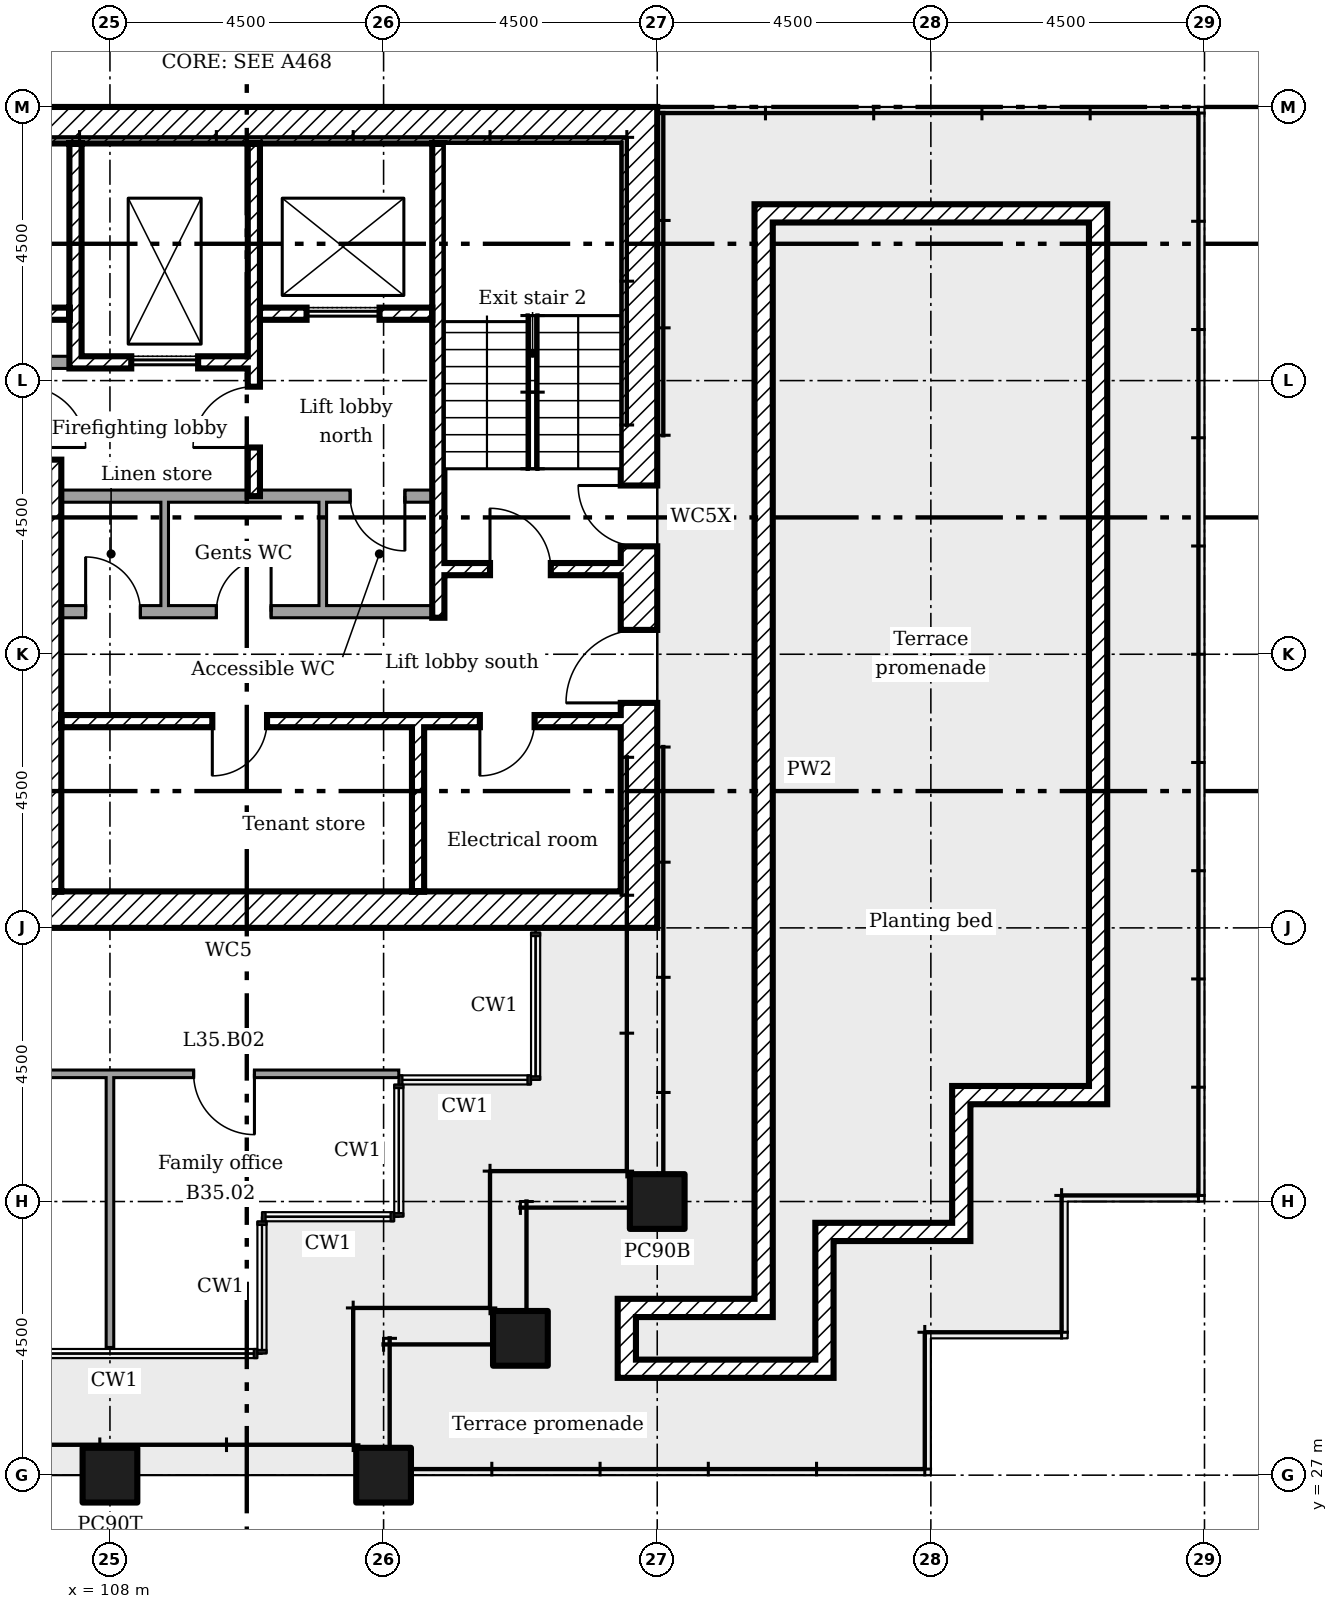
"""IFC4 building model, lengths in metres.
Left out: names, types, materials, properties, quantities, classifications, styles, units other than length and angle.
Written with IfcOpenShell. Run it as: python <this file> out.ifc"""

import sys

from ifc_helpers import new_model, si_unit, direction, frame, frame_2d, origin, origin_2d, place, context, subcontext, project, spatial, rectangle, extrude, element, fill, save


model = new_model("IFC4")
c1 = context("Model", 3, precision=1e-05, world=origin(), true_north=direction((0.0, 1.0)))
c2 = subcontext(c1, "Body", "Model", "MODEL_VIEW")
j1 = project(units=[si_unit("LENGTHUNIT", "METRE"), si_unit("PLANEANGLEUNIT", "RADIAN")], contexts=[c1])
p1 = place(None, origin())
s1 = spatial("IfcSite", under=j1, at=p1, CompositionType="ELEMENT")
p2 = place(p1, origin())
s2 = spatial("IfcBuilding", under=s1, at=p2, CompositionType="ELEMENT")
p3 = place(p2, frame((0.0, 0.0, 143.8)))
s3 = spatial("IfcBuildingStorey", under=s2, at=p3, CompositionType="ELEMENT", Elevation=143.8)
for number, where in (
    (1, (108.0, 27.0, 0.0)),
    (2, (112.5, 27.0, 0.0)),
    (3, (114.75, 29.25, 0.0)),
    (4, (117.0, 31.5, 0.0)),
):
    element("IfcColumn", number, at=place(p3, frame(where)), inside=s3, PredefinedType="COLUMN", context=c2, shape_type="SweptSolid", body=[
        extrude(rectangle(XDim=0.9, YDim=0.9, at=origin_2d()), origin(), (0.0, 0.0, 1.0), 3.6),
    ])
p4 = place(p3, frame((116.5, 29.9, 0.0), z_axis=(0.0, 0.0, 1.0), x_axis=(0.0, -1.0, 0.0)))
e5 = element("IfcWall", 5, at=p4, inside=s3, PredefinedType="SOLIDWALL", context=c2, shape_type="SweptSolid", body=[
    extrude(rectangle(XDim=1.3, YDim=0.3, at=frame_2d((0.65, 0.0))), origin(), (0.0, 0.0, 1.0), 0.6),
])
p5 = place(p3, frame((116.65, 28.75, 0.0)))
e6 = element("IfcWall", 6, at=p5, inside=s3, PredefinedType="SOLIDWALL", context=c2, shape_type="SweptSolid", body=[
    extrude(rectangle(XDim=3.25, YDim=0.3, at=frame_2d((1.625, 0.0))), origin(), (0.0, 0.0, 1.0), 0.6),
])
p6 = place(p3, frame((119.75, 28.9, 0.0), z_axis=(0.0, 0.0, 1.0), x_axis=(0.0, 1.0, 0.0)))
e7 = element("IfcWall", 7, at=p6, inside=s3, PredefinedType="SOLIDWALL", context=c2, shape_type="SweptSolid", body=[
    extrude(rectangle(XDim=2.25, YDim=0.3, at=frame_2d((1.125, 0.0))), origin(), (0.0, 0.0, 1.0), 0.6),
])
p7 = place(p3, frame((119.9, 31.0, 0.0)))
e8 = element("IfcWall", 8, at=p7, inside=s3, PredefinedType="SOLIDWALL", context=c2, shape_type="SweptSolid", body=[
    extrude(rectangle(XDim=2.25, YDim=0.3, at=frame_2d((1.125, 0.0))), origin(), (0.0, 0.0, 1.0), 0.6),
])
p8 = place(p3, frame((122.0, 31.15, 0.0), z_axis=(0.0, 0.0, 1.0), x_axis=(0.0, 1.0, 0.0)))
e9 = element("IfcWall", 9, at=p8, inside=s3, PredefinedType="SOLIDWALL", context=c2, shape_type="SweptSolid", body=[
    extrude(rectangle(XDim=2.25, YDim=0.3, at=frame_2d((1.125, 0.0))), origin(), (0.0, 0.0, 1.0), 0.6),
])
p9 = place(p3, frame((122.15, 33.25, 0.0)))
e10 = element("IfcWall", 10, at=p9, inside=s3, PredefinedType="SOLIDWALL", context=c2, shape_type="SweptSolid", body=[
    extrude(rectangle(XDim=2.25, YDim=0.3, at=frame_2d((1.125, 0.0))), origin(), (0.0, 0.0, 1.0), 0.6),
])
p10 = place(p3, frame((124.25, 33.4, 0.0), z_axis=(0.0, 0.0, 1.0), x_axis=(0.0, 1.0, 0.0)))
e11 = element("IfcWall", 11, at=p10, inside=s3, PredefinedType="SOLIDWALL", context=c2, shape_type="SweptSolid", body=[
    extrude(rectangle(XDim=14.5, YDim=0.3, at=frame_2d((7.25, 0.0))), origin(), (0.0, 0.0, 1.0), 0.6),
])
p11 = place(p3, frame((124.1, 47.75, 0.0), z_axis=(0.0, 0.0, 1.0), x_axis=(-1.0, 0.0, 0.0)))
e12 = element("IfcWall", 12, at=p11, inside=s3, PredefinedType="SOLIDWALL", context=c2, shape_type="SweptSolid", body=[
    extrude(rectangle(XDim=5.5, YDim=0.3, at=frame_2d((2.75, 0.0))), origin(), (0.0, 0.0, 1.0), 0.6),
])
p12 = place(p3, frame((118.75, 47.6, 0.0), z_axis=(0.0, 0.0, 1.0), x_axis=(0.0, -1.0, 0.0)))
e13 = element("IfcWall", 13, at=p12, inside=s3, PredefinedType="SOLIDWALL", context=c2, shape_type="SweptSolid", body=[
    extrude(rectangle(XDim=18.0, YDim=0.3, at=frame_2d((9.0, 0.0))), origin(), (0.0, 0.0, 1.0), 0.6),
])
p13 = place(p3, frame((118.6, 29.75, 0.0), z_axis=(0.0, 0.0, 1.0), x_axis=(-1.0, 0.0, 0.0)))
e14 = element("IfcWall", 14, at=p13, inside=s3, PredefinedType="SOLIDWALL", context=c2, shape_type="SweptSolid", body=[
    extrude(rectangle(XDim=1.95, YDim=0.3, at=frame_2d((0.975, 0.0))), origin(), (0.0, 0.0, 1.0), 0.6),
])
p14 = place(p3, frame((116.7, 36.0, 0.0), z_axis=(0.0, 0.0, 1.0), x_axis=(0.0, 1.0, 0.0)))
e15 = element("IfcWall", 15, at=p14, inside=s3, PredefinedType="SHEAR", context=c2, shape_type="SweptSolid", body=[
    extrude(rectangle(XDim=13.5, YDim=0.6, at=frame_2d((6.75, 0.0))), origin(), (0.0, 0.0, 1.0), 3.35),
])
p15 = place(p14, frame((3.7, 0.0, 0.0)))
e16 = element("IfcOpeningElement", 16, at=p15, cuts=e15, PredefinedType="OPENING", context=c2, shape_type="SweptSolid", body=[
    extrude(rectangle(XDim=1.2, YDim=2.1, at=frame_2d((0.6, 1.05))), frame((0.0, 0.31, 0.0), z_axis=(0.0, -1.0, 0.0), x_axis=(1.0, 0.0, 0.0)), (0.0, 0.0, 1.0), 0.62),
])
p16 = place(p14, frame((6.275, 0.0, 0.0)))
e17 = element("IfcOpeningElement", 17, at=p16, cuts=e15, PredefinedType="OPENING", context=c2, shape_type="SweptSolid", body=[
    extrude(rectangle(XDim=1.0, YDim=2.1, at=frame_2d((0.5, 1.05))), frame((0.0, 0.31, 0.0), z_axis=(0.0, -1.0, 0.0), x_axis=(1.0, 0.0, 0.0)), (0.0, 0.0, 1.0), 0.62),
])
for number, where in (
    (18, (103.5, 49.2, 0.0)),
    (19, (103.5, 36.3, 0.0)),
):
    element("IfcWall", number, at=place(p3, frame(where)), inside=s3, PredefinedType="SHEAR", context=c2, shape_type="SweptSolid", body=[
        extrude(rectangle(XDim=12.9, YDim=0.6, at=frame_2d((6.45, 0.0))), origin(), (0.0, 0.0, 1.0), 3.35),
    ])
p17 = place(p3, frame((107.433, 48.9, 0.0), z_axis=(0.0, 0.0, 1.0), x_axis=(0.0, -1.0, 0.0)))
e20 = element("IfcWall", 20, at=p17, inside=s3, PredefinedType="SHEAR", context=c2, shape_type="SweptSolid", body=[
    extrude(rectangle(XDim=3.7, YDim=0.2, at=frame_2d((1.85, 0.0))), origin(), (0.0, 0.0, 1.0), 3.35),
])
p18 = place(p3, frame((110.367, 48.9, 0.0), z_axis=(0.0, 0.0, 1.0), x_axis=(0.0, -1.0, 0.0)))
e21 = element("IfcWall", 21, at=p18, inside=s3, PredefinedType="SHEAR", context=c2, shape_type="SweptSolid", body=[
    extrude(rectangle(XDim=5.8, YDim=0.2, at=frame_2d((2.9, 0.0))), origin(), (0.0, 0.0, 1.0), 3.35),
])
p19 = place(p18, frame((4.0, 0.0, 0.0)))
e22 = element("IfcOpeningElement", 22, at=p19, cuts=e21, PredefinedType="OPENING", context=c2, shape_type="SweptSolid", body=[
    extrude(rectangle(XDim=1.0, YDim=2.1, at=frame_2d((0.5, 1.05))), frame((0.0, 0.11, 0.0), z_axis=(0.0, -1.0, 0.0), x_axis=(1.0, 0.0, 0.0)), (0.0, 0.0, 1.0), 0.22),
])
p20 = place(p3, frame((113.067, 36.6, 0.0), z_axis=(0.0, 0.0, 1.0), x_axis=(0.0, 1.0, 0.0)))
e23 = element("IfcWall", 23, at=p20, inside=s3, PredefinedType="SHEAR", context=c2, shape_type="SweptSolid", body=[
    extrude(rectangle(XDim=2.7, YDim=0.2, at=frame_2d((1.35, 0.0))), origin(), (0.0, 0.0, 1.0), 3.35),
])
p21 = place(p3, frame((106.5, 45.3, 0.0)))
e24 = element("IfcWall", 24, at=p21, inside=s3, PredefinedType="PARTITIONING", context=c2, shape_type="SweptSolid", body=[
    extrude(rectangle(XDim=0.833, YDim=0.2, at=frame_2d((0.417, 0.0))), origin(), (0.0, 0.0, 1.0), 3.35),
])
p22 = place(p3, frame((104.1, 46.1, 0.0)))
e25 = element("IfcWall", 25, at=p22, inside=s3, PredefinedType="SHEAR", context=c2, shape_type="SweptSolid", body=[
    extrude(rectangle(XDim=3.233, YDim=0.2, at=frame_2d((1.617, 0.0))), origin(), (0.0, 0.0, 1.0), 3.35),
])
p23 = place(p22, frame((1.267, 0.0, 0.0)))
e26 = element("IfcOpeningElement", 26, at=p23, cuts=e25, PredefinedType="OPENING", context=c2, shape_type="SweptSolid", body=[
    extrude(rectangle(XDim=1.2, YDim=2.1, at=frame_2d((0.6, 1.05))), frame((0.0, 0.11, 0.0), z_axis=(0.0, -1.0, 0.0), x_axis=(1.0, 0.0, 0.0)), (0.0, 0.0, 1.0), 0.22),
])
p24 = place(p3, frame((110.467, 46.1, 0.0)))
e27 = element("IfcWall", 27, at=p24, inside=s3, PredefinedType="SHEAR", context=c2, shape_type="SweptSolid", body=[
    extrude(rectangle(XDim=2.833, YDim=0.2, at=frame_2d((1.417, 0.0))), origin(), (0.0, 0.0, 1.0), 3.35),
])
p25 = place(p24, frame((0.767, 0.0, 0.0)))
e28 = element("IfcOpeningElement", 28, at=p25, cuts=e27, PredefinedType="OPENING", context=c2, shape_type="SweptSolid", body=[
    extrude(rectangle(XDim=1.2, YDim=2.1, at=frame_2d((0.6, 1.05))), frame((0.0, 0.11, 0.0), z_axis=(0.0, -1.0, 0.0), x_axis=(1.0, 0.0, 0.0)), (0.0, 0.0, 1.0), 0.22),
])
p26 = place(p3, frame((107.533, 45.3, 0.0)))
e29 = element("IfcWall", 29, at=p26, inside=s3, PredefinedType="SHEAR", context=c2, shape_type="SweptSolid", body=[
    extrude(rectangle(XDim=2.733, YDim=0.2, at=frame_2d((1.367, 0.0))), origin(), (0.0, 0.0, 1.0), 3.35),
])
p27 = place(p26, frame((0.817, 0.0, 0.0)))
e30 = element("IfcOpeningElement", 30, at=p27, cuts=e29, PredefinedType="OPENING", context=c2, shape_type="SweptSolid", body=[
    extrude(rectangle(XDim=1.1, YDim=2.1, at=frame_2d((0.55, 1.05))), frame((0.0, 0.11, 0.0), z_axis=(0.0, -1.0, 0.0), x_axis=(1.0, 0.0, 0.0)), (0.0, 0.0, 1.0), 0.22),
])
p28 = place(p3, frame((107.2, 39.4, 0.0)))
e31 = element("IfcWall", 31, at=p28, inside=s3, PredefinedType="SHEAR", context=c2, shape_type="SweptSolid", body=[
    extrude(rectangle(XDim=9.2, YDim=0.2, at=frame_2d((4.6, 0.0))), origin(), (0.0, 0.0, 1.0), 3.35),
])
p29 = place(p28, frame((2.483, 0.0, 0.0)))
e32 = element("IfcOpeningElement", 32, at=p29, cuts=e31, PredefinedType="OPENING", context=c2, shape_type="SweptSolid", body=[
    extrude(rectangle(XDim=0.9, YDim=2.1, at=frame_2d((0.45, 1.05))), frame((0.0, 0.11, 0.0), z_axis=(0.0, -1.0, 0.0), x_axis=(1.0, 0.0, 0.0)), (0.0, 0.0, 1.0), 0.22),
])
p30 = place(p28, frame((6.883, 0.0, 0.0)))
e33 = element("IfcOpeningElement", 33, at=p30, cuts=e31, PredefinedType="OPENING", context=c2, shape_type="SweptSolid", body=[
    extrude(rectangle(XDim=0.9, YDim=2.1, at=frame_2d((0.45, 1.05))), frame((0.0, 0.11, 0.0), z_axis=(0.0, -1.0, 0.0), x_axis=(1.0, 0.0, 0.0)), (0.0, 0.0, 1.0), 0.22),
])
p31 = place(p3, frame((107.1, 36.6, 0.0), z_axis=(0.0, 0.0, 1.0), x_axis=(0.0, 1.0, 0.0)))
e34 = element("IfcWall", 34, at=p31, inside=s3, PredefinedType="SHEAR", context=c2, shape_type="SweptSolid", body=[
    extrude(rectangle(XDim=7.1, YDim=0.2, at=frame_2d((3.55, 0.0))), origin(), (0.0, 0.0, 1.0), 3.35),
])
p32 = place(p3, frame((113.5, 41.9, 0.0)))
e35 = element("IfcWall", 35, at=p32, inside=s3, PredefinedType="SHEAR", context=c2, shape_type="SweptSolid", body=[
    extrude(rectangle(XDim=2.9, YDim=0.2, at=frame_2d((1.45, 0.0))), origin(), (0.0, 0.0, 1.0), 3.35),
])
p33 = place(p32, frame((0.75, 0.0, 0.0)))
e36 = element("IfcOpeningElement", 36, at=p33, cuts=e35, PredefinedType="OPENING", context=c2, shape_type="SweptSolid", body=[
    extrude(rectangle(XDim=1.0, YDim=2.1, at=frame_2d((0.5, 1.05))), frame((0.0, 0.11, 0.0), z_axis=(0.0, -1.0, 0.0), x_axis=(1.0, 0.0, 0.0)), (0.0, 0.0, 1.0), 0.22),
])
p34 = place(p3, frame((113.4, 41.1, 0.0), z_axis=(0.0, 0.0, 1.0), x_axis=(0.0, 1.0, 0.0)))
e37 = element("IfcWall", 37, at=p34, inside=s3, PredefinedType="SHEAR", context=c2, shape_type="SweptSolid", body=[
    extrude(rectangle(XDim=7.8, YDim=0.2, at=frame_2d((3.9, 0.0))), origin(), (0.0, 0.0, 1.0), 3.35),
])
p35 = place(p3, frame((107.2, 43.1, 0.0)))
e38 = element("IfcWall", 38, at=p35, inside=s3, PredefinedType="PARTITIONING", context=c2, shape_type="SweptSolid", body=[
    extrude(rectangle(XDim=6.1, YDim=0.2, at=frame_2d((3.05, 0.0))), origin(), (0.0, 0.0, 1.0), 3.35),
])
p36 = place(p35, frame((4.75, 0.0, 0.0)))
e39 = element("IfcOpeningElement", 39, at=p36, cuts=e38, PredefinedType="OPENING", context=c2, shape_type="SweptSolid", body=[
    extrude(rectangle(XDim=0.9, YDim=2.1, at=frame_2d((0.45, 1.05))), frame((0.0, 0.11, 0.0), z_axis=(0.0, -1.0, 0.0), x_axis=(1.0, 0.0, 0.0)), (0.0, 0.0, 1.0), 0.22),
])
p37 = place(p3, frame((107.2, 41.2, 0.0)))
e40 = element("IfcWall", 40, at=p37, inside=s3, PredefinedType="PARTITIONING", context=c2, shape_type="SweptSolid", body=[
    extrude(rectangle(XDim=6.1, YDim=0.2, at=frame_2d((3.05, 0.0))), origin(), (0.0, 0.0, 1.0), 3.35),
])
p38 = place(p37, frame((0.4, 0.0, 0.0)))
e41 = element("IfcOpeningElement", 41, at=p38, cuts=e40, PredefinedType="OPENING", context=c2, shape_type="SweptSolid", body=[
    extrude(rectangle(XDim=0.9, YDim=2.1, at=frame_2d((0.45, 1.05))), frame((0.0, 0.11, 0.0), z_axis=(0.0, -1.0, 0.0), x_axis=(1.0, 0.0, 0.0)), (0.0, 0.0, 1.0), 0.22),
])
p39 = place(p37, frame((2.55, 0.0, 0.0)))
e42 = element("IfcOpeningElement", 42, at=p39, cuts=e40, PredefinedType="OPENING", context=c2, shape_type="SweptSolid", body=[
    extrude(rectangle(XDim=0.9, YDim=2.1, at=frame_2d((0.45, 1.05))), frame((0.0, 0.11, 0.0), z_axis=(0.0, -1.0, 0.0), x_axis=(1.0, 0.0, 0.0)), (0.0, 0.0, 1.0), 0.22),
])
for number, where, z_axis, x_axis in (
    (43, (108.9, 41.3, 0.0), (0.0, 0.0, 1.0), (0.0, 1.0, 0.0)),
    (44, (111.5, 41.3, 0.0), (0.0, 0.0, 1.0), (0.0, 1.0, 0.0)),
):
    element("IfcWall", number, at=place(p3, frame(where, z_axis=z_axis, x_axis=x_axis)), inside=s3, PredefinedType="PARTITIONING", context=c2, shape_type="SweptSolid", body=[
        extrude(rectangle(XDim=1.7, YDim=0.125, at=frame_2d((0.85, 0.0))), origin(), (0.0, 0.0, 1.0), 3.35),
    ])
p40 = place(p3, frame((99.837, 33.6, 0.0)))
e45 = element("IfcWall", 45, at=p40, inside=s3, PredefinedType="PARTITIONING", context=c2, shape_type="SweptSolid", body=[
    extrude(rectangle(XDim=12.913, YDim=0.125, at=frame_2d((6.456, 0.0))), origin(), (0.0, 0.0, 1.0), 3.45),
])
p41 = place(p40, frame((3.913, 0.0, 0.0)))
e46 = element("IfcOpeningElement", 46, at=p41, cuts=e45, PredefinedType="OPENING", context=c2, shape_type="SweptSolid", body=[
    extrude(rectangle(XDim=1.0, YDim=2.1, at=frame_2d((0.5, 1.05))), frame((0.0, 0.073, 0.0), z_axis=(0.0, -1.0, 0.0), x_axis=(1.0, 0.0, 0.0)), (0.0, 0.0, 1.0), 0.145),
])
p42 = place(p40, frame((9.539, 0.0, 0.0)))
e47 = element("IfcOpeningElement", 47, at=p42, cuts=e45, PredefinedType="OPENING", context=c2, shape_type="SweptSolid", body=[
    extrude(rectangle(XDim=1.0, YDim=2.1, at=frame_2d((0.5, 1.05))), frame((0.0, 0.073, 0.0), z_axis=(0.0, -1.0, 0.0), x_axis=(1.0, 0.0, 0.0)), (0.0, 0.0, 1.0), 0.145),
])
p43 = place(p3, frame((108.0, 29.1, 0.0), z_axis=(0.0, 0.0, 1.0), x_axis=(0.0, 1.0, 0.0)))
e48 = element("IfcWall", 48, at=p43, inside=s3, PredefinedType="PARTITIONING", context=c2, shape_type="SweptSolid", body=[
    extrude(rectangle(XDim=4.5, YDim=0.125, at=frame_2d((2.25, 0.0))), origin(), (0.0, 0.0, 1.0), 2.851),
])
p44 = place(p15, origin())
e49 = element("IfcDoor", 49, at=p44, inside=s3, OperationType="SINGLE_SWING_RIGHT", PredefinedType="DOOR", context=c2, shape_type="SweptSolid", body=[
    extrude(rectangle(XDim=1.2, YDim=2.1, at=frame_2d((0.6, 1.05))), frame((0.0, 0.025, 0.0), z_axis=(0.0, -1.0, 0.0), x_axis=(1.0, 0.0, 0.0)), (0.0, 0.0, 1.0), 0.05),
])
fill(e16, e49)
p45 = place(p33, origin())
e50 = element("IfcDoor", 50, at=p45, inside=s3, OperationType="SINGLE_SWING_RIGHT", PredefinedType="DOOR", context=c2, shape_type="SweptSolid", body=[
    extrude(rectangle(XDim=1.0, YDim=2.1, at=frame_2d((0.5, 1.05))), frame((0.0, 0.025, 0.0), z_axis=(0.0, -1.0, 0.0), x_axis=(1.0, 0.0, 0.0)), (0.0, 0.0, 1.0), 0.05),
])
fill(e36, e50)
p46 = place(p16, origin())
e51 = element("IfcDoor", 51, at=p46, inside=s3, OperationType="SINGLE_SWING_LEFT", PredefinedType="DOOR", context=c2, shape_type="SweptSolid", body=[
    extrude(rectangle(XDim=1.0, YDim=2.1, at=frame_2d((0.5, 1.05))), frame((0.0, 0.025, 0.0), z_axis=(0.0, -1.0, 0.0), x_axis=(1.0, 0.0, 0.0)), (0.0, 0.0, 1.0), 0.05),
])
fill(e17, e51)
p47 = place(p19, frame((1.0, 0.0, 0.0), x_axis=(-1.0, 0.0, 0.0)))
e52 = element("IfcDoor", 52, at=p47, inside=s3, OperationType="SINGLE_SWING_RIGHT", PredefinedType="DOOR", context=c2, shape_type="SweptSolid", body=[
    extrude(rectangle(XDim=1.0, YDim=2.1, at=frame_2d((0.5, 1.05))), frame((0.0, 0.025, 0.0), z_axis=(0.0, -1.0, 0.0), x_axis=(1.0, 0.0, 0.0)), (0.0, 0.0, 1.0), 0.05),
])
fill(e22, e52)
p48 = place(p29, frame((0.9, 0.0, 0.0), x_axis=(-1.0, 0.0, 0.0)))
e53 = element("IfcDoor", 53, at=p48, inside=s3, OperationType="SINGLE_SWING_LEFT", PredefinedType="DOOR", context=c2, shape_type="SweptSolid", body=[
    extrude(rectangle(XDim=0.9, YDim=2.1, at=frame_2d((0.45, 1.05))), frame((0.0, 0.025, 0.0), z_axis=(0.0, -1.0, 0.0), x_axis=(1.0, 0.0, 0.0)), (0.0, 0.0, 1.0), 0.05),
])
fill(e32, e53)
p49 = place(p30, frame((0.9, 0.0, 0.0), x_axis=(-1.0, 0.0, 0.0)))
e54 = element("IfcDoor", 54, at=p49, inside=s3, OperationType="SINGLE_SWING_LEFT", PredefinedType="DOOR", context=c2, shape_type="SweptSolid", body=[
    extrude(rectangle(XDim=0.9, YDim=2.1, at=frame_2d((0.45, 1.05))), frame((0.0, 0.025, 0.0), z_axis=(0.0, -1.0, 0.0), x_axis=(1.0, 0.0, 0.0)), (0.0, 0.0, 1.0), 0.05),
])
fill(e33, e54)
p50 = place(p38, origin())
e55 = element("IfcDoor", 55, at=p50, inside=s3, OperationType="SINGLE_SWING_RIGHT", PredefinedType="DOOR", context=c2, shape_type="SweptSolid", body=[
    extrude(rectangle(XDim=0.9, YDim=2.1, at=frame_2d((0.45, 1.05))), frame((0.0, 0.025, 0.0), z_axis=(0.0, -1.0, 0.0), x_axis=(1.0, 0.0, 0.0)), (0.0, 0.0, 1.0), 0.05),
])
fill(e41, e55)
p51 = place(p39, origin())
e56 = element("IfcDoor", 56, at=p51, inside=s3, OperationType="SINGLE_SWING_LEFT", PredefinedType="DOOR", context=c2, shape_type="SweptSolid", body=[
    extrude(rectangle(XDim=0.9, YDim=2.1, at=frame_2d((0.45, 1.05))), frame((0.0, 0.025, 0.0), z_axis=(0.0, -1.0, 0.0), x_axis=(1.0, 0.0, 0.0)), (0.0, 0.0, 1.0), 0.05),
])
fill(e42, e56)
p52 = place(p36, frame((0.9, 0.0, 0.0), x_axis=(-1.0, 0.0, 0.0)))
e57 = element("IfcDoor", 57, at=p52, inside=s3, OperationType="SINGLE_SWING_RIGHT", PredefinedType="DOOR", context=c2, shape_type="SweptSolid", body=[
    extrude(rectangle(XDim=0.9, YDim=2.1, at=frame_2d((0.45, 1.05))), frame((0.0, 0.025, 0.0), z_axis=(0.0, -1.0, 0.0), x_axis=(1.0, 0.0, 0.0)), (0.0, 0.0, 1.0), 0.05),
])
fill(e39, e57)
p53 = place(p27, origin())
e58 = element("IfcDoor", 58, at=p53, inside=s3, OperationType="SLIDING_TO_LEFT", PredefinedType="DOOR", context=c2, shape_type="SweptSolid", body=[
    extrude(rectangle(XDim=1.1, YDim=2.1, at=frame_2d((0.55, 1.05))), frame((0.0, 0.025, 0.0), z_axis=(0.0, -1.0, 0.0), x_axis=(1.0, 0.0, 0.0)), (0.0, 0.0, 1.0), 0.05),
])
fill(e30, e58)
p54 = place(p25, origin())
e59 = element("IfcDoor", 59, at=p54, inside=s3, OperationType="SLIDING_TO_LEFT", PredefinedType="DOOR", context=c2, shape_type="SweptSolid", body=[
    extrude(rectangle(XDim=1.2, YDim=2.1, at=frame_2d((0.6, 1.05))), frame((0.0, 0.025, 0.0), z_axis=(0.0, -1.0, 0.0), x_axis=(1.0, 0.0, 0.0)), (0.0, 0.0, 1.0), 0.05),
])
fill(e28, e59)
p55 = place(p42, frame((1.0, 0.0, 0.0), x_axis=(-1.0, 0.0, 0.0)))
e60 = element("IfcDoor", 60, at=p55, inside=s3, OperationType="SINGLE_SWING_RIGHT", PredefinedType="DOOR", context=c2, shape_type="SweptSolid", body=[
    extrude(rectangle(XDim=1.0, YDim=2.1, at=frame_2d((0.5, 1.05))), frame((0.0, 0.025, 0.0), z_axis=(0.0, -1.0, 0.0), x_axis=(1.0, 0.0, 0.0)), (0.0, 0.0, 1.0), 0.05),
])
fill(e47, e60)
save(model, sys.argv[1])
